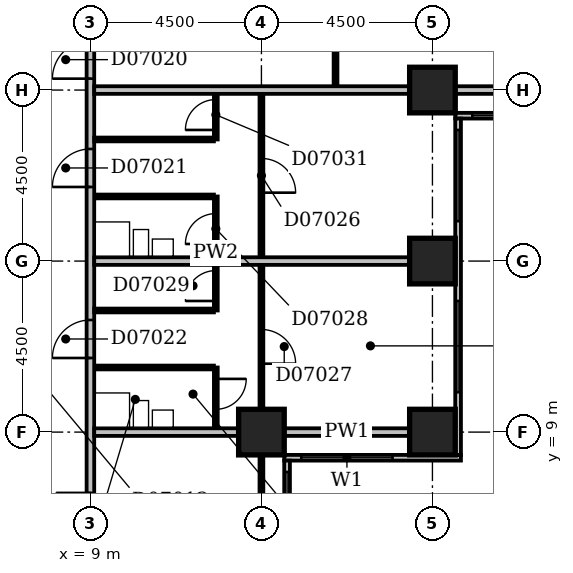
"""IFC4 building model, lengths in metres.
Left out: names, types, materials, properties, quantities, classifications, styles, units other than length and angle.
Written with IfcOpenShell. Run it as: python <this file> out.ifc"""

import sys

from ifc_helpers import new_model, si_unit, direction, frame, frame_2d, origin, origin_2d, place, context, subcontext, project, spatial, rectangle, extrude, element, fill, save


model = new_model("IFC4")
c1 = context("Model", 3, precision=1e-05, world=origin(), true_north=direction((0.0, 1.0)))
c2 = subcontext(c1, "Body", "Model", "MODEL_VIEW")
j1 = project(units=[si_unit("LENGTHUNIT", "METRE"), si_unit("PLANEANGLEUNIT", "RADIAN")], contexts=[c1])
p1 = place(None, origin())
s1 = spatial("IfcSite", under=j1, at=p1, CompositionType="ELEMENT")
p2 = place(p1, origin())
s2 = spatial("IfcBuilding", under=s1, at=p2, CompositionType="ELEMENT")
p3 = place(p2, frame((0.0, 0.0, 36.2)))
s3 = spatial("IfcBuildingStorey", under=s2, at=p3, CompositionType="ELEMENT", Elevation=36.2)
for number, where, z_axis, x_axis in (
    (1, (13.5, 9.0, -0.3), (0.0, 0.0, 1.0), (1.0, 0.0, 0.0)),
    (2, (18.0, 9.0, -0.3), (0.0, 0.0, 1.0), (1.0, 0.0, 0.0)),
    (3, (18.0, 13.5, -0.3), (0.0, 0.0, 1.0), (1.0, 0.0, 0.0)),
    (4, (18.0, 18.0, -0.3), (0.0, 0.0, 1.0), (1.0, 0.0, 0.0)),
):
    element("IfcColumn", number, at=place(p3, frame(where, z_axis=z_axis, x_axis=x_axis)), inside=s3, PredefinedType="COLUMN", context=c2, shape_type="SweptSolid", body=[
        extrude(rectangle(XDim=1.2, YDim=1.2, at=origin_2d()), origin(), (0.0, 0.0, 1.0), 3.6),
    ])
p4 = place(p3, frame((14.175, 3.9, 0.0), z_axis=(0.0, 0.0, 1.0), x_axis=(0.0, 1.0, 0.0)))
e5 = element("IfcWall", 5, at=p4, inside=s3, PredefinedType="STANDARD", context=c2, shape_type="SweptSolid", body=[
    extrude(rectangle(XDim=4.35, YDim=0.15, at=frame_2d((2.175, 0.0))), origin(), (0.0, 0.0, 1.0), 2.7),
])
p5 = place(p4, frame((1.65, 0.0, 0.6)))
e6 = element("IfcOpeningElement", 6, at=p5, cuts=e5, PredefinedType="OPENING", context=c2, shape_type="SweptSolid", body=[
    extrude(rectangle(XDim=2.4, YDim=1.8, at=frame_2d((1.2, 0.9))), frame((0.0, 0.087, 0.0), z_axis=(0.0, -1.0, 0.0), x_axis=(1.0, 0.0, 0.0)), (0.0, 0.0, 1.0), 0.174),
])
p6 = place(p3, frame((14.1, 8.325, 0.0), z_axis=(0.0, 0.0, 1.0), x_axis=(1.0, 0.0, 0.0)))
e7 = element("IfcWall", 7, at=p6, inside=s3, PredefinedType="STANDARD", context=c2, shape_type="SweptSolid", body=[
    extrude(rectangle(XDim=4.65, YDim=0.15, at=frame_2d((2.325, 0.0))), origin(), (0.0, 0.0, 1.0), 2.7),
])
p7 = place(p6, frame((0.45, 0.0, 0.6)))
e8 = element("IfcOpeningElement", 8, at=p7, cuts=e7, PredefinedType="OPENING", context=c2, shape_type="SweptSolid", body=[
    extrude(rectangle(XDim=2.4, YDim=1.8, at=frame_2d((1.2, 0.9))), frame((0.0, 0.087, 0.0), z_axis=(0.0, -1.0, 0.0), x_axis=(1.0, 0.0, 0.0)), (0.0, 0.0, 1.0), 0.174),
])
p8 = place(p3, frame((18.675, 8.4, 0.0), z_axis=(0.0, 0.0, 1.0), x_axis=(0.0, 1.0, 0.0)))
e9 = element("IfcWall", 9, at=p8, inside=s3, PredefinedType="STANDARD", context=c2, shape_type="SweptSolid", body=[
    extrude(rectangle(XDim=8.85, YDim=0.15, at=frame_2d((4.425, 0.0))), origin(), (0.0, 0.0, 1.0), 2.7),
])
p9 = place(p8, frame((1.65, 0.0, 0.6)))
e10 = element("IfcOpeningElement", 10, at=p9, cuts=e9, PredefinedType="OPENING", context=c2, shape_type="SweptSolid", body=[
    extrude(rectangle(XDim=2.4, YDim=1.8, at=frame_2d((1.2, 0.9))), frame((0.0, 0.087, 0.0), z_axis=(0.0, -1.0, 0.0), x_axis=(1.0, 0.0, 0.0)), (0.0, 0.0, 1.0), 0.174),
])
p10 = place(p8, frame((6.15, 0.0, 0.6)))
e11 = element("IfcOpeningElement", 11, at=p10, cuts=e9, PredefinedType="OPENING", context=c2, shape_type="SweptSolid", body=[
    extrude(rectangle(XDim=2.4, YDim=1.8, at=frame_2d((1.2, 0.9))), frame((0.0, 0.087, 0.0), z_axis=(0.0, -1.0, 0.0), x_axis=(1.0, 0.0, 0.0)), (0.0, 0.0, 1.0), 0.174),
])
p11 = place(p3, frame((18.6, 17.325, 0.0), z_axis=(0.0, 0.0, 1.0), x_axis=(1.0, 0.0, 0.0)))
e12 = element("IfcWall", 12, at=p11, inside=s3, PredefinedType="STANDARD", context=c2, shape_type="SweptSolid", body=[
    extrude(rectangle(XDim=4.65, YDim=0.15, at=frame_2d((2.325, 0.0))), origin(), (0.0, 0.0, 1.0), 2.7),
])
p12 = place(p11, frame((0.45, 0.0, 0.6)))
e13 = element("IfcOpeningElement", 13, at=p12, cuts=e12, PredefinedType="OPENING", context=c2, shape_type="SweptSolid", body=[
    extrude(rectangle(XDim=2.4, YDim=1.8, at=frame_2d((1.2, 0.9))), frame((0.0, 0.087, 0.0), z_axis=(0.0, -1.0, 0.0), x_axis=(1.0, 0.0, 0.0)), (0.0, 0.0, 1.0), 0.174),
])
p13 = place(p3, frame((9.0, 5.0, 0.0), z_axis=(0.0, 0.0, 1.0), x_axis=(0.0, 1.0, 0.0)))
e14 = element("IfcWall", 14, at=p13, inside=s3, PredefinedType="PARTITIONING", context=c2, shape_type="SweptSolid", body=[
    extrude(rectangle(XDim=44.5, YDim=0.2, at=frame_2d((22.25, 0.0))), origin(), (0.0, 0.0, 1.0), 3.3),
])
p14 = place(p13, frame((24.7, 0.0, 0.0)))
e15 = element("IfcOpeningElement", 15, at=p14, cuts=e14, PredefinedType="OPENING", context=c2, shape_type="SweptSolid", body=[
    extrude(rectangle(XDim=1.0, YDim=2.1, at=frame_2d((0.5, 1.05))), frame((0.0, 0.112, 0.0), z_axis=(0.0, -1.0, 0.0), x_axis=(1.0, 0.0, 0.0)), (0.0, 0.0, 1.0), 0.224),
])
p15 = place(p13, frame((13.3, 0.0, 0.0)))
e16 = element("IfcOpeningElement", 16, at=p15, cuts=e14, PredefinedType="OPENING", context=c2, shape_type="SweptSolid", body=[
    extrude(rectangle(XDim=1.0, YDim=2.1, at=frame_2d((0.5, 1.05))), frame((0.0, 0.112, 0.0), z_axis=(0.0, -1.0, 0.0), x_axis=(1.0, 0.0, 0.0)), (0.0, 0.0, 1.0), 0.224),
])
p16 = place(p13, frame((10.45, 0.0, 0.0)))
e17 = element("IfcOpeningElement", 17, at=p16, cuts=e14, PredefinedType="OPENING", context=c2, shape_type="SweptSolid", body=[
    extrude(rectangle(XDim=1.0, YDim=2.1, at=frame_2d((0.5, 1.05))), frame((0.0, 0.112, 0.0), z_axis=(0.0, -1.0, 0.0), x_axis=(1.0, 0.0, 0.0)), (0.0, 0.0, 1.0), 0.224),
])
p17 = place(p13, frame((5.95, 0.0, 0.0)))
e18 = element("IfcOpeningElement", 18, at=p17, cuts=e14, PredefinedType="OPENING", context=c2, shape_type="SweptSolid", body=[
    extrude(rectangle(XDim=1.0, YDim=2.1, at=frame_2d((0.5, 1.05))), frame((0.0, 0.112, 0.0), z_axis=(0.0, -1.0, 0.0), x_axis=(1.0, 0.0, 0.0)), (0.0, 0.0, 1.0), 0.224),
])
p18 = place(p13, frame((37.25, 0.0, 0.0)))
e19 = element("IfcOpeningElement", 19, at=p18, cuts=e14, PredefinedType="OPENING", context=c2, shape_type="SweptSolid", body=[
    extrude(rectangle(XDim=0.9, YDim=2.1, at=frame_2d((0.45, 1.05))), frame((0.0, 0.112, 0.0), z_axis=(0.0, -1.0, 0.0), x_axis=(1.0, 0.0, 0.0)), (0.0, 0.0, 1.0), 0.224),
])
p19 = place(p13, frame((1.5, 0.0, 0.0)))
e20 = element("IfcOpeningElement", 20, at=p19, cuts=e14, PredefinedType="OPENING", context=c2, shape_type="SweptSolid", body=[
    extrude(rectangle(XDim=0.9, YDim=2.1, at=frame_2d((0.45, 1.05))), frame((0.0, 0.112, 0.0), z_axis=(0.0, -1.0, 0.0), x_axis=(1.0, 0.0, 0.0)), (0.0, 0.0, 1.0), 0.224),
])
p20 = place(p3, frame((13.5, 5.1, 0.0), z_axis=(0.0, 0.0, 1.0), x_axis=(0.0, 1.0, 0.0)))
e21 = element("IfcWall", 21, at=p20, inside=s3, PredefinedType="PARTITIONING", context=c2, shape_type="SweptSolid", body=[
    extrude(rectangle(XDim=3.3, YDim=0.1, at=frame_2d((1.65, 0.0))), origin(), (0.0, 0.0, 1.0), 2.7),
])
p21 = place(p3, frame((9.1, 9.0, 0.0), z_axis=(0.0, 0.0, 1.0), x_axis=(1.0, 0.0, 0.0)))
e22 = element("IfcWall", 22, at=p21, inside=s3, PredefinedType="PARTITIONING", context=c2, shape_type="SweptSolid", body=[
    extrude(rectangle(XDim=3.8, YDim=0.2, at=frame_2d((1.9, 0.0))), origin(), (0.0, 0.0, 1.0), 3.3),
])
p22 = place(p3, frame((14.1, 9.0, 0.0), z_axis=(0.0, 0.0, 1.0), x_axis=(1.0, 0.0, 0.0)))
e23 = element("IfcWall", 23, at=p22, inside=s3, PredefinedType="PARTITIONING", context=c2, shape_type="SweptSolid", body=[
    extrude(rectangle(XDim=3.3, YDim=0.2, at=frame_2d((1.65, 0.0))), origin(), (0.0, 0.0, 1.0), 2.7),
])
p23 = place(p3, frame((12.3, 9.1, 0.0), z_axis=(0.0, 0.0, 1.0), x_axis=(0.0, 1.0, 0.0)))
e24 = element("IfcWall", 24, at=p23, inside=s3, PredefinedType="PARTITIONING", context=c2, shape_type="SweptSolid", body=[
    extrude(rectangle(XDim=1.6, YDim=0.1, at=frame_2d((0.8, 0.0))), origin(), (0.0, 0.0, 1.0), 3.3),
])
p24 = place(p23, frame((0.5, 0.0, 0.0)))
e25 = element("IfcOpeningElement", 25, at=p24, cuts=e24, PredefinedType="OPENING", context=c2, shape_type="SweptSolid", body=[
    extrude(rectangle(XDim=0.8, YDim=2.1, at=frame_2d((0.4, 1.05))), frame((0.0, 0.062, 0.0), z_axis=(0.0, -1.0, 0.0), x_axis=(1.0, 0.0, 0.0)), (0.0, 0.0, 1.0), 0.124),
])
p25 = place(p3, frame((13.5, 9.6, 0.0), z_axis=(0.0, 0.0, 1.0), x_axis=(0.0, 1.0, 0.0)))
e26 = element("IfcWall", 26, at=p25, inside=s3, PredefinedType="PARTITIONING", context=c2, shape_type="SweptSolid", body=[
    extrude(rectangle(XDim=8.3, YDim=0.1, at=frame_2d((4.15, 0.0))), origin(), (0.0, 0.0, 1.0), 3.3),
])
p26 = place(p25, frame((5.7, 0.0, 0.0)))
e27 = element("IfcOpeningElement", 27, at=p26, cuts=e26, PredefinedType="OPENING", context=c2, shape_type="SweptSolid", body=[
    extrude(rectangle(XDim=0.9, YDim=2.1, at=frame_2d((0.45, 1.05))), frame((0.0, 0.062, 0.0), z_axis=(0.0, -1.0, 0.0), x_axis=(1.0, 0.0, 0.0)), (0.0, 0.0, 1.0), 0.124),
])
p27 = place(p25, frame((1.2, 0.0, 0.0)))
e28 = element("IfcOpeningElement", 28, at=p27, cuts=e26, PredefinedType="OPENING", context=c2, shape_type="SweptSolid", body=[
    extrude(rectangle(XDim=0.9, YDim=2.1, at=frame_2d((0.45, 1.05))), frame((0.0, 0.062, 0.0), z_axis=(0.0, -1.0, 0.0), x_axis=(1.0, 0.0, 0.0)), (0.0, 0.0, 1.0), 0.124),
])
p28 = place(p3, frame((9.1, 10.7, 0.0), z_axis=(0.0, 0.0, 1.0), x_axis=(1.0, 0.0, 0.0)))
e29 = element("IfcWall", 29, at=p28, inside=s3, PredefinedType="PLUMBINGWALL", context=c2, shape_type="SweptSolid", body=[
    extrude(rectangle(XDim=3.15, YDim=0.1, at=frame_2d((1.575, 0.0))), origin(), (0.0, 0.0, 1.0), 3.3),
])
p29 = place(p3, frame((9.1, 12.2, 0.0), z_axis=(0.0, 0.0, 1.0), x_axis=(1.0, 0.0, 0.0)))
e30 = element("IfcWall", 30, at=p29, inside=s3, PredefinedType="PARTITIONING", context=c2, shape_type="SweptSolid", body=[
    extrude(rectangle(XDim=3.15, YDim=0.1, at=frame_2d((1.575, 0.0))), origin(), (0.0, 0.0, 1.0), 3.3),
])
p30 = place(p3, frame((12.3, 12.2, 0.0), z_axis=(0.0, 0.0, 1.0), x_axis=(0.0, 1.0, 0.0)))
e31 = element("IfcWall", 31, at=p30, inside=s3, PredefinedType="PARTITIONING", context=c2, shape_type="SweptSolid", body=[
    extrude(rectangle(XDim=3.0, YDim=0.1, at=frame_2d((1.5, 0.0))), origin(), (0.0, 0.0, 1.0), 3.3),
])
p31 = place(p30, frame((1.75, 0.0, 0.0)))
e32 = element("IfcOpeningElement", 32, at=p31, cuts=e31, PredefinedType="OPENING", context=c2, shape_type="SweptSolid", body=[
    extrude(rectangle(XDim=0.8, YDim=2.1, at=frame_2d((0.4, 1.05))), frame((0.0, 0.062, 0.0), z_axis=(0.0, -1.0, 0.0), x_axis=(1.0, 0.0, 0.0)), (0.0, 0.0, 1.0), 0.124),
])
p32 = place(p30, frame((0.25, 0.0, 0.0)))
e33 = element("IfcOpeningElement", 33, at=p32, cuts=e31, PredefinedType="OPENING", context=c2, shape_type="SweptSolid", body=[
    extrude(rectangle(XDim=0.8, YDim=2.1, at=frame_2d((0.4, 1.05))), frame((0.0, 0.062, 0.0), z_axis=(0.0, -1.0, 0.0), x_axis=(1.0, 0.0, 0.0)), (0.0, 0.0, 1.0), 0.124),
])
p33 = place(p3, frame((9.1, 13.5, 0.0), z_axis=(0.0, 0.0, 1.0), x_axis=(1.0, 0.0, 0.0)))
e34 = element("IfcWall", 34, at=p33, inside=s3, PredefinedType="PARTITIONING", context=c2, shape_type="SweptSolid", body=[
    extrude(rectangle(XDim=8.3, YDim=0.2, at=frame_2d((4.15, 0.0))), origin(), (0.0, 0.0, 1.0), 3.3),
])
p34 = place(p3, frame((9.1, 15.2, 0.0), z_axis=(0.0, 0.0, 1.0), x_axis=(1.0, 0.0, 0.0)))
e35 = element("IfcWall", 35, at=p34, inside=s3, PredefinedType="PLUMBINGWALL", context=c2, shape_type="SweptSolid", body=[
    extrude(rectangle(XDim=3.15, YDim=0.1, at=frame_2d((1.575, 0.0))), origin(), (0.0, 0.0, 1.0), 3.3),
])
p35 = place(p3, frame((9.1, 16.7, 0.0), z_axis=(0.0, 0.0, 1.0), x_axis=(1.0, 0.0, 0.0)))
e36 = element("IfcWall", 36, at=p35, inside=s3, PredefinedType="PARTITIONING", context=c2, shape_type="SweptSolid", body=[
    extrude(rectangle(XDim=3.15, YDim=0.1, at=frame_2d((1.575, 0.0))), origin(), (0.0, 0.0, 1.0), 3.3),
])
p36 = place(p3, frame((12.3, 16.7, 0.0), z_axis=(0.0, 0.0, 1.0), x_axis=(0.0, 1.0, 0.0)))
e37 = element("IfcWall", 37, at=p36, inside=s3, PredefinedType="PARTITIONING", context=c2, shape_type="SweptSolid", body=[
    extrude(rectangle(XDim=1.2, YDim=0.1, at=frame_2d((0.6, 0.0))), origin(), (0.0, 0.0, 1.0), 3.3),
])
p37 = place(p36, frame((0.25, 0.0, 0.0)))
e38 = element("IfcOpeningElement", 38, at=p37, cuts=e37, PredefinedType="OPENING", context=c2, shape_type="SweptSolid", body=[
    extrude(rectangle(XDim=0.8, YDim=2.1, at=frame_2d((0.4, 1.05))), frame((0.0, 0.062, 0.0), z_axis=(0.0, -1.0, 0.0), x_axis=(1.0, 0.0, 0.0)), (0.0, 0.0, 1.0), 0.124),
])
p38 = place(p3, frame((9.1, 18.0, 0.0), z_axis=(0.0, 0.0, 1.0), x_axis=(1.0, 0.0, 0.0)))
e39 = element("IfcWall", 39, at=p38, inside=s3, PredefinedType="PARTITIONING", context=c2, shape_type="SweptSolid", body=[
    extrude(rectangle(XDim=8.3, YDim=0.2, at=frame_2d((4.15, 0.0))), origin(), (0.0, 0.0, 1.0), 2.6),
])
p39 = place(p3, frame((18.6, 18.0, 0.0), z_axis=(0.0, 0.0, 1.0), x_axis=(1.0, 0.0, 0.0)))
e40 = element("IfcWall", 40, at=p39, inside=s3, PredefinedType="PARTITIONING", context=c2, shape_type="SweptSolid", body=[
    extrude(rectangle(XDim=3.3, YDim=0.2, at=frame_2d((1.65, 0.0))), origin(), (0.0, 0.0, 1.0), 2.7),
])
p40 = place(p3, frame((15.45, 18.1, 0.0), z_axis=(0.0, 0.0, 1.0), x_axis=(0.0, 1.0, 0.0)))
e41 = element("IfcWall", 41, at=p40, inside=s3, PredefinedType="PARTITIONING", context=c2, shape_type="SweptSolid", body=[
    extrude(rectangle(XDim=8.8, YDim=0.1, at=frame_2d((4.4, 0.0))), origin(), (0.0, 0.0, 1.0), 3.3),
])
p41 = place(p40, frame((1.7, 0.0, 0.0)))
e42 = element("IfcOpeningElement", 42, at=p41, cuts=e41, PredefinedType="OPENING", context=c2, shape_type="SweptSolid", body=[
    extrude(rectangle(XDim=0.9, YDim=2.1, at=frame_2d((0.45, 1.05))), frame((0.0, 0.062, 0.0), z_axis=(0.0, -1.0, 0.0), x_axis=(1.0, 0.0, 0.0)), (0.0, 0.0, 1.0), 0.124),
])
p42 = place(p40, frame((6.2, 0.0, 0.0)))
e43 = element("IfcOpeningElement", 43, at=p42, cuts=e41, PredefinedType="OPENING", context=c2, shape_type="SweptSolid", body=[
    extrude(rectangle(XDim=0.9, YDim=2.1, at=frame_2d((0.45, 1.05))), frame((0.0, 0.062, 0.0), z_axis=(0.0, -1.0, 0.0), x_axis=(1.0, 0.0, 0.0)), (0.0, 0.0, 1.0), 0.124),
])
p43 = place(p5, origin())
e44 = element("IfcWindow", 44, at=p43, inside=s3, PartitioningType="SINGLE_PANEL", PredefinedType="WINDOW", context=c2, shape_type="SweptSolid", body=[
    extrude(rectangle(XDim=2.4, YDim=1.8, at=frame_2d((1.2, 0.9))), frame((0.0, 0.03, 0.0), z_axis=(0.0, -1.0, 0.0), x_axis=(1.0, 0.0, 0.0)), (0.0, 0.0, 1.0), 0.06),
])
fill(e6, e44)
p44 = place(p7, origin())
e45 = element("IfcWindow", 45, at=p44, inside=s3, PartitioningType="SINGLE_PANEL", PredefinedType="WINDOW", context=c2, shape_type="SweptSolid", body=[
    extrude(rectangle(XDim=2.4, YDim=1.8, at=frame_2d((1.2, 0.9))), frame((0.0, 0.03, 0.0), z_axis=(0.0, -1.0, 0.0), x_axis=(1.0, 0.0, 0.0)), (0.0, 0.0, 1.0), 0.06),
])
fill(e8, e45)
p45 = place(p9, origin())
e46 = element("IfcWindow", 46, at=p45, inside=s3, PartitioningType="SINGLE_PANEL", PredefinedType="WINDOW", context=c2, shape_type="SweptSolid", body=[
    extrude(rectangle(XDim=2.4, YDim=1.8, at=frame_2d((1.2, 0.9))), frame((0.0, 0.03, 0.0), z_axis=(0.0, -1.0, 0.0), x_axis=(1.0, 0.0, 0.0)), (0.0, 0.0, 1.0), 0.06),
])
fill(e10, e46)
p46 = place(p10, origin())
e47 = element("IfcWindow", 47, at=p46, inside=s3, PartitioningType="SINGLE_PANEL", PredefinedType="WINDOW", context=c2, shape_type="SweptSolid", body=[
    extrude(rectangle(XDim=2.4, YDim=1.8, at=frame_2d((1.2, 0.9))), frame((0.0, 0.03, 0.0), z_axis=(0.0, -1.0, 0.0), x_axis=(1.0, 0.0, 0.0)), (0.0, 0.0, 1.0), 0.06),
])
fill(e11, e47)
p47 = place(p12, origin())
e48 = element("IfcWindow", 48, at=p47, inside=s3, PartitioningType="SINGLE_PANEL", PredefinedType="WINDOW", context=c2, shape_type="SweptSolid", body=[
    extrude(rectangle(XDim=2.4, YDim=1.8, at=frame_2d((1.2, 0.9))), frame((0.0, 0.03, 0.0), z_axis=(0.0, -1.0, 0.0), x_axis=(1.0, 0.0, 0.0)), (0.0, 0.0, 1.0), 0.06),
])
fill(e13, e48)
p48 = place(p15, origin())
e49 = element("IfcDoor", 49, at=p48, inside=s3, OperationType="SINGLE_SWING_LEFT", PredefinedType="DOOR", context=c2, shape_type="SweptSolid", body=[
    extrude(rectangle(XDim=1.0, YDim=2.1, at=frame_2d((0.5, 1.05))), frame((0.0, 0.025, 0.0), z_axis=(0.0, -1.0, 0.0), x_axis=(1.0, 0.0, 0.0)), (0.0, 0.0, 1.0), 0.05),
])
fill(e16, e49)
p49 = place(p16, origin())
e50 = element("IfcDoor", 50, at=p49, inside=s3, OperationType="SINGLE_SWING_LEFT", PredefinedType="DOOR", context=c2, shape_type="SweptSolid", body=[
    extrude(rectangle(XDim=1.0, YDim=2.1, at=frame_2d((0.5, 1.05))), frame((0.0, 0.025, 0.0), z_axis=(0.0, -1.0, 0.0), x_axis=(1.0, 0.0, 0.0)), (0.0, 0.0, 1.0), 0.05),
])
fill(e17, e50)
p50 = place(p17, origin())
e51 = element("IfcDoor", 51, at=p50, inside=s3, OperationType="SINGLE_SWING_LEFT", PredefinedType="DOOR", context=c2, shape_type="SweptSolid", body=[
    extrude(rectangle(XDim=1.0, YDim=2.1, at=frame_2d((0.5, 1.05))), frame((0.0, 0.025, 0.0), z_axis=(0.0, -1.0, 0.0), x_axis=(1.0, 0.0, 0.0)), (0.0, 0.0, 1.0), 0.05),
])
fill(e18, e51)
p51 = place(p24, origin())
e52 = element("IfcDoor", 52, at=p51, inside=s3, OperationType="SINGLE_SWING_RIGHT", PredefinedType="DOOR", context=c2, shape_type="SweptSolid", body=[
    extrude(rectangle(XDim=0.8, YDim=2.1, at=frame_2d((0.4, 1.05))), frame((0.0, 0.025, 0.0), z_axis=(0.0, -1.0, 0.0), x_axis=(1.0, 0.0, 0.0)), (0.0, 0.0, 1.0), 0.05),
])
fill(e25, e52)
p52 = place(p26, frame((0.9, 0.0, 0.0), z_axis=(0.0, 0.0, 1.0), x_axis=(-1.0, 0.0, 0.0)))
e53 = element("IfcDoor", 53, at=p52, inside=s3, OperationType="SINGLE_SWING_RIGHT", PredefinedType="DOOR", context=c2, shape_type="SweptSolid", body=[
    extrude(rectangle(XDim=0.9, YDim=2.1, at=frame_2d((0.45, 1.05))), frame((0.0, 0.025, 0.0), z_axis=(0.0, -1.0, 0.0), x_axis=(1.0, 0.0, 0.0)), (0.0, 0.0, 1.0), 0.05),
])
fill(e27, e53)
p53 = place(p27, frame((0.9, 0.0, 0.0), z_axis=(0.0, 0.0, 1.0), x_axis=(-1.0, 0.0, 0.0)))
e54 = element("IfcDoor", 54, at=p53, inside=s3, OperationType="SINGLE_SWING_RIGHT", PredefinedType="DOOR", context=c2, shape_type="SweptSolid", body=[
    extrude(rectangle(XDim=0.9, YDim=2.1, at=frame_2d((0.45, 1.05))), frame((0.0, 0.025, 0.0), z_axis=(0.0, -1.0, 0.0), x_axis=(1.0, 0.0, 0.0)), (0.0, 0.0, 1.0), 0.05),
])
fill(e28, e54)
p54 = place(p31, origin())
e55 = element("IfcDoor", 55, at=p54, inside=s3, OperationType="SINGLE_SWING_LEFT", PredefinedType="DOOR", context=c2, shape_type="SweptSolid", body=[
    extrude(rectangle(XDim=0.8, YDim=2.1, at=frame_2d((0.4, 1.05))), frame((0.0, 0.025, 0.0), z_axis=(0.0, -1.0, 0.0), x_axis=(1.0, 0.0, 0.0)), (0.0, 0.0, 1.0), 0.05),
])
fill(e32, e55)
p55 = place(p32, origin())
e56 = element("IfcDoor", 56, at=p55, inside=s3, OperationType="SINGLE_SWING_LEFT", PredefinedType="DOOR", context=c2, shape_type="SweptSolid", body=[
    extrude(rectangle(XDim=0.8, YDim=2.1, at=frame_2d((0.4, 1.05))), frame((0.0, 0.025, 0.0), z_axis=(0.0, -1.0, 0.0), x_axis=(1.0, 0.0, 0.0)), (0.0, 0.0, 1.0), 0.05),
])
fill(e33, e56)
p56 = place(p37, origin())
e57 = element("IfcDoor", 57, at=p56, inside=s3, OperationType="SINGLE_SWING_LEFT", PredefinedType="DOOR", context=c2, shape_type="SweptSolid", body=[
    extrude(rectangle(XDim=0.8, YDim=2.1, at=frame_2d((0.4, 1.05))), frame((0.0, 0.025, 0.0), z_axis=(0.0, -1.0, 0.0), x_axis=(1.0, 0.0, 0.0)), (0.0, 0.0, 1.0), 0.05),
])
fill(e38, e57)
save(model, sys.argv[1])
